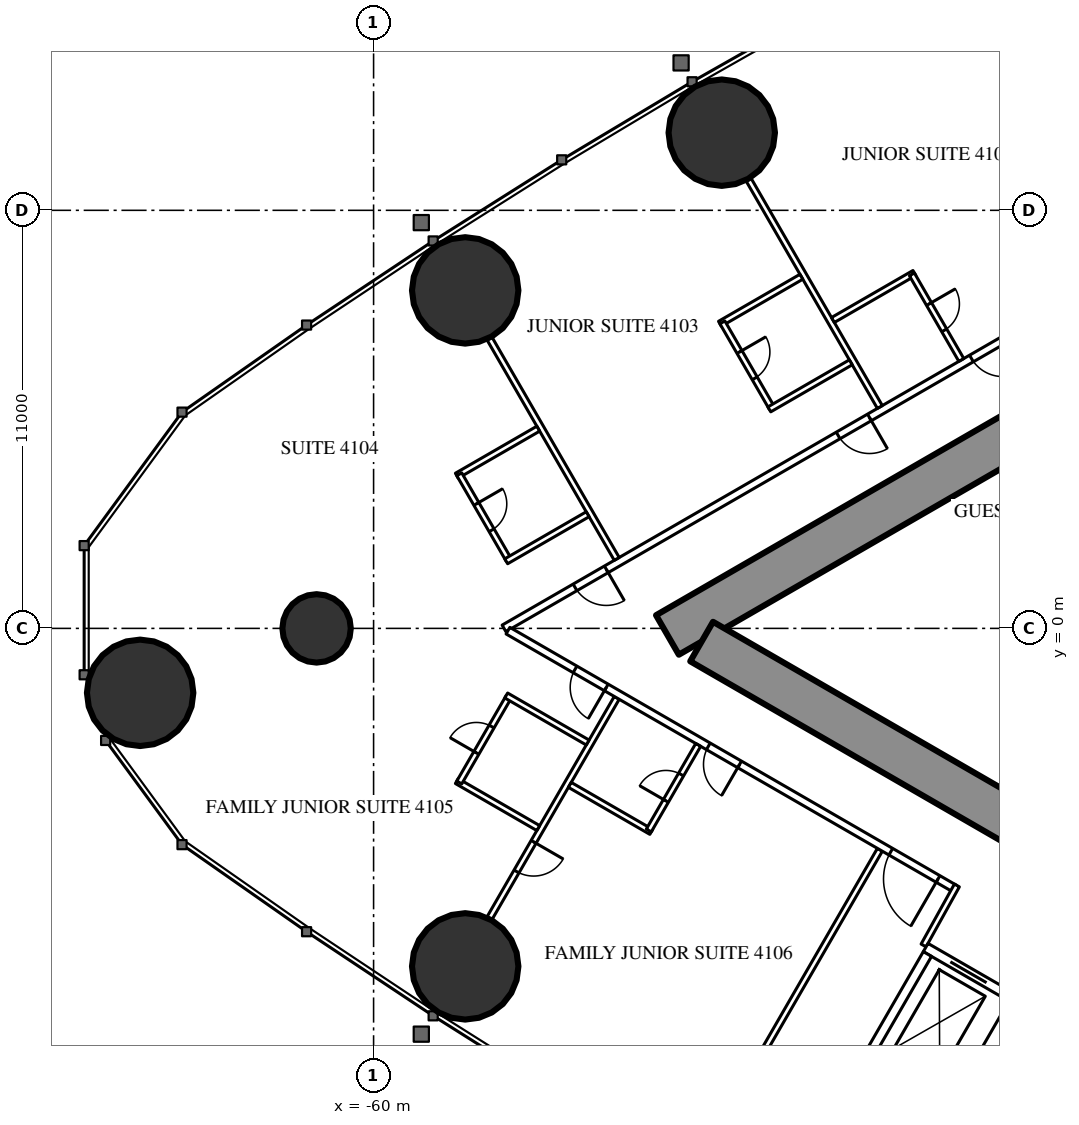
"""IFC4 building model, lengths in metres.
Left out: names, types, materials, properties, quantities, classifications, styles, units other than length and angle.
Written with IfcOpenShell. Run it as: python <this file> out.ifc"""

import sys

from ifc_helpers import new_model, si_unit, direction, frame, frame_2d, origin, origin_2d, place, context, subcontext, project, spatial, rectangle, circle, extrude, element, fill, save


model = new_model("IFC4")
c1 = context("Model", 3, precision=1e-05, world=origin(), true_north=direction((0.0, 1.0)))
c2 = subcontext(c1, "Body", "Model", "MODEL_VIEW")
j1 = project(units=[si_unit("LENGTHUNIT", "METRE"), si_unit("PLANEANGLEUNIT", "RADIAN")], contexts=[c1])
p1 = place(None, origin())
s1 = spatial("IfcSite", under=j1, at=p1, CompositionType="ELEMENT")
p2 = place(p1, origin())
s2 = spatial("IfcBuilding", under=s1, at=p2, CompositionType="ELEMENT")
p3 = place(p2, frame((0.0, 0.0, 156.3)))
s3 = spatial("IfcBuildingStorey", under=s2, at=p3, CompositionType="ELEMENT", Elevation=156.3)
for number, where, z_axis, x_axis in (
    (1, (-66.143, -1.695, 0.0), (0.0, 0.0, 1.0), (1.0, 0.0, 0.0)),
    (2, (-57.59, -8.893, 0.0), (0.0, 0.0, 1.0), (1.0, 0.0, 0.0)),
    (3, (-50.839, 13.043, 0.0), (0.0, 0.0, 1.0), (1.0, 0.0, 0.0)),
    (4, (-57.59, 8.893, 0.0), (0.0, 0.0, 1.0), (1.0, 0.0, 0.0)),
):
    element("IfcColumn", number, at=place(p3, frame(where, z_axis=z_axis, x_axis=x_axis)), inside=s3, PredefinedType="COLUMN", context=c2, shape_type="SweptSolid", body=[
        extrude(circle(Radius=1.4, at=origin_2d()), origin(), (0.0, 0.0, 1.0), 3.5),
    ])
p4 = place(p3, frame((-61.5, 0.0, 0.0), z_axis=(0.0, 0.0, 1.0), x_axis=(1.0, 0.0, 0.0)))
e5 = element("IfcColumn", 5, at=p4, inside=s3, PredefinedType="COLUMN", context=c2, shape_type="SweptSolid", body=[
    extrude(circle(Radius=0.9, at=origin_2d()), origin(), (0.0, 0.0, 1.0), 3.5),
])
p5 = place(p3, frame((-27.2, 14.3, 0.0), z_axis=(0.0, 0.0, 1.0), x_axis=(-0.866026593062, -0.499997940104, 0.0)))
e6 = element("IfcWall", 6, at=p5, inside=s3, PredefinedType="SHEAR", context=c2, shape_type="SweptSolid", body=[
    extrude(rectangle(XDim=28.946, YDim=1.2, at=frame_2d((14.473, 0.0))), origin(), (0.0, 0.0, 1.0), 3.5),
])
p6 = place(p5, frame((4.6, 0.0, 0.0)))
e7 = element("IfcOpeningElement", 7, at=p6, cuts=e6, PredefinedType="OPENING", context=c2, shape_type="SweptSolid", body=[
    extrude(rectangle(XDim=1.0, YDim=2.2, at=frame_2d((0.5, 1.1))), frame((0.0, 0.61, 0.0), z_axis=(0.0, -1.0, 0.0), x_axis=(1.0, 0.0, 0.0)), (0.0, 0.0, 1.0), 1.22),
])
p7 = place(p5, frame((13.395, 0.0, 0.0)))
e8 = element("IfcOpeningElement", 8, at=p7, cuts=e6, PredefinedType="OPENING", context=c2, shape_type="SweptSolid", body=[
    extrude(rectangle(XDim=1.8, YDim=2.2, at=frame_2d((0.9, 1.1))), frame((0.0, 0.61, 0.0), z_axis=(0.0, -1.0, 0.0), x_axis=(1.0, 0.0, 0.0)), (0.0, 0.0, 1.0), 1.22),
])
p8 = place(p3, frame((-27.2, -14.3, 0.0), z_axis=(0.0, 0.0, 1.0), x_axis=(-0.866024021859, 0.500002393557, 0.0)))
e9 = element("IfcWall", 9, at=p8, inside=s3, PredefinedType="SHEAR", context=c2, shape_type="SweptSolid", body=[
    extrude(rectangle(XDim=27.907, YDim=1.2, at=frame_2d((13.954, 0.0))), origin(), (0.0, 0.0, 1.0), 3.5),
])
p9 = place(p8, frame((4.6, 0.0, 0.0)))
e10 = element("IfcOpeningElement", 10, at=p9, cuts=e9, PredefinedType="OPENING", context=c2, shape_type="SweptSolid", body=[
    extrude(rectangle(XDim=1.0, YDim=2.2, at=frame_2d((0.5, 1.1))), frame((0.0, 0.61, 0.0), z_axis=(0.0, -1.0, 0.0), x_axis=(1.0, 0.0, 0.0)), (0.0, 0.0, 1.0), 1.22),
])
p10 = place(p8, frame((13.395, 0.0, 0.0)))
e11 = element("IfcOpeningElement", 11, at=p10, cuts=e9, PredefinedType="OPENING", context=c2, shape_type="SweptSolid", body=[
    extrude(rectangle(XDim=1.8, YDim=2.2, at=frame_2d((0.9, 1.1))), frame((0.0, 0.61, 0.0), z_axis=(0.0, -1.0, 0.0), x_axis=(1.0, 0.0, 0.0)), (0.0, 0.0, 1.0), 1.22),
])
p11 = place(p3, frame((-27.86, 16.575, 0.0), z_axis=(0.0, 0.0, 1.0), x_axis=(-0.866025533911, -0.499999774615, 0.0)))
e12 = element("IfcWall", 12, at=p11, inside=s3, PredefinedType="PARTITIONING", context=c2, shape_type="SweptSolid", body=[
    extrude(rectangle(XDim=33.149, YDim=0.2, at=frame_2d((16.575, 0.0))), origin(), (0.0, 0.0, 1.0), 3.25),
])
p12 = place(p11, frame((3.75, 0.0, 0.0)))
e13 = element("IfcOpeningElement", 13, at=p12, cuts=e12, PredefinedType="OPENING", context=c2, shape_type="SweptSolid", body=[
    extrude(rectangle(XDim=1.0, YDim=2.2, at=frame_2d((0.5, 1.1))), frame((0.0, 0.11, 0.0), z_axis=(0.0, -1.0, 0.0), x_axis=(1.0, 0.0, 0.0)), (0.0, 0.0, 1.0), 0.22),
])
p13 = place(p11, frame((17.997, 0.0, 0.0)))
e14 = element("IfcOpeningElement", 14, at=p13, cuts=e12, PredefinedType="OPENING", context=c2, shape_type="SweptSolid", body=[
    extrude(rectangle(XDim=0.95, YDim=2.2, at=frame_2d((0.475, 1.1))), frame((0.0, 0.11, 0.0), z_axis=(0.0, -1.0, 0.0), x_axis=(1.0, 0.0, 0.0)), (0.0, 0.0, 1.0), 0.22),
])
p14 = place(p11, frame((22.047, 0.0, 0.0)))
e15 = element("IfcOpeningElement", 15, at=p14, cuts=e12, PredefinedType="OPENING", context=c2, shape_type="SweptSolid", body=[
    extrude(rectangle(XDim=0.95, YDim=2.2, at=frame_2d((0.475, 1.1))), frame((0.0, 0.11, 0.0), z_axis=(0.0, -1.0, 0.0), x_axis=(1.0, 0.0, 0.0)), (0.0, 0.0, 1.0), 0.22),
])
p15 = place(p11, frame((30.042, 0.0, 0.0)))
e16 = element("IfcOpeningElement", 16, at=p15, cuts=e12, PredefinedType="OPENING", context=c2, shape_type="SweptSolid", body=[
    extrude(rectangle(XDim=0.95, YDim=2.2, at=frame_2d((0.475, 1.1))), frame((0.0, 0.11, 0.0), z_axis=(0.0, -1.0, 0.0), x_axis=(1.0, 0.0, 0.0)), (0.0, 0.0, 1.0), 0.22),
])
p16 = place(p3, frame((-46.679, 5.825, 0.0), z_axis=(0.0, 0.0, 1.0), x_axis=(-0.500006839597, 0.866021454905, 0.0)))
e17 = element("IfcWall", 17, at=p16, inside=s3, PredefinedType="PARTITIONING", context=c2, shape_type="SweptSolid", body=[
    extrude(rectangle(XDim=6.911, YDim=0.15, at=frame_2d((3.456, 0.0))), origin(), (0.0, 0.0, 1.0), 2.3),
])
p17 = place(p3, frame((-53.602, 1.828, 0.0), z_axis=(0.0, 0.0, 1.0), x_axis=(-0.49999191814, 0.866030069798, 0.0)))
e18 = element("IfcWall", 18, at=p17, inside=s3, PredefinedType="PARTITIONING", context=c2, shape_type="SweptSolid", body=[
    extrude(rectangle(XDim=6.692, YDim=0.15, at=frame_2d((3.346, 0.0))), origin(), (0.0, 0.0, 1.0), 2.3),
])
p18 = place(p3, frame((-46.679, -5.825, 0.0), z_axis=(0.0, 0.0, 1.0), x_axis=(-0.500006839597, -0.866021454905, 0.0)))
e19 = element("IfcWall", 19, at=p18, inside=s3, PredefinedType="PARTITIONING", context=c2, shape_type="SweptSolid", body=[
    extrude(rectangle(XDim=6.911, YDim=0.15, at=frame_2d((3.456, 0.0))), origin(), (0.0, 0.0, 1.0), 2.3),
])
p19 = place(p3, frame((-53.602, -1.828, 0.0), z_axis=(0.0, 0.0, 1.0), x_axis=(-0.49999191814, -0.866030069798, 0.0)))
e20 = element("IfcWall", 20, at=p19, inside=s3, PredefinedType="PARTITIONING", context=c2, shape_type="SweptSolid", body=[
    extrude(rectangle(XDim=6.692, YDim=0.15, at=frame_2d((3.346, 0.0))), origin(), (0.0, 0.0, 1.0), 2.3),
])
p20 = place(p19, frame((4.375, 0.0, 0.0)))
e21 = element("IfcOpeningElement", 21, at=p20, cuts=e20, PredefinedType="OPENING", context=c2, shape_type="SweptSolid", body=[
    extrude(rectangle(XDim=0.9, YDim=2.2, at=frame_2d((0.45, 1.1))), frame((0.0, 0.085, 0.0), z_axis=(0.0, -1.0, 0.0), x_axis=(1.0, 0.0, 0.0)), (0.0, 0.0, 1.0), 0.17),
])
p21 = place(p3, frame((-44.715, -6.844, 0.0), z_axis=(0.0, 0.0, 1.0), x_axis=(-0.866025261224, 0.500000246922, 0.0)))
e22 = element("IfcWall", 22, at=p21, inside=s3, PredefinedType="PARTITIONING", context=c2, shape_type="SweptSolid", body=[
    extrude(rectangle(XDim=13.567, YDim=0.2, at=frame_2d((6.783, 0.0))), origin(), (0.0, 0.0, 1.0), 3.25),
])
p22 = place(p21, frame((10.579, 0.0, 0.0)))
e23 = element("IfcOpeningElement", 23, at=p22, cuts=e22, PredefinedType="OPENING", context=c2, shape_type="SweptSolid", body=[
    extrude(rectangle(XDim=0.95, YDim=2.2, at=frame_2d((0.475, 1.1))), frame((0.0, 0.11, 0.0), z_axis=(0.0, -1.0, 0.0), x_axis=(1.0, 0.0, 0.0)), (0.0, 0.0, 1.0), 0.22),
])
p23 = place(p21, frame((6.529, 0.0, 0.0)))
e24 = element("IfcOpeningElement", 24, at=p23, cuts=e22, PredefinedType="OPENING", context=c2, shape_type="SweptSolid", body=[
    extrude(rectangle(XDim=0.95, YDim=2.2, at=frame_2d((0.475, 1.1))), frame((0.0, 0.11, 0.0), z_axis=(0.0, -1.0, 0.0), x_axis=(1.0, 0.0, 0.0)), (0.0, 0.0, 1.0), 0.22),
])
p24 = place(p21, frame((0.5, 0.0, 0.0)))
e25 = element("IfcOpeningElement", 25, at=p24, cuts=e22, PredefinedType="OPENING", context=c2, shape_type="SweptSolid", body=[
    extrude(rectangle(XDim=1.435, YDim=2.2, at=frame_2d((0.718, 1.1))), frame((0.0, 0.11, 0.0), z_axis=(0.0, -1.0, 0.0), x_axis=(1.0, 0.0, 0.0)), (0.0, 0.0, 1.0), 0.22),
])
p25 = place(p3, frame((-44.652, -6.764, 0.0), z_axis=(0.0, 0.0, 1.0), x_axis=(-0.485424724123, -0.874278466629, 0.0)))
e26 = element("IfcWall", 26, at=p25, inside=s3, PredefinedType="PARTITIONING", context=c2, shape_type="SweptSolid", body=[
    extrude(rectangle(XDim=1.805, YDim=0.15, at=frame_2d((0.903, 0.0))), origin(), (0.0, 0.0, 1.0), 3.25),
])
p26 = place(p3, frame((-45.771, 9.352, 0.0), z_axis=(0.0, 0.0, 1.0), x_axis=(-0.866006523861, -0.500032699561, 0.0)))
e27 = element("IfcWall", 27, at=p26, inside=s3, PredefinedType="PARTITIONING", context=c2, shape_type="SweptSolid", body=[
    extrude(rectangle(XDim=2.475, YDim=0.15, at=frame_2d((1.237, 0.0))), origin(), (0.0, 0.0, 1.0), 3.25),
])
p27 = place(p3, frame((-44.535, 7.063, 0.0), z_axis=(0.0, 0.0, 1.0), x_axis=(-0.500047596559, 0.865997922154, 0.0)))
e28 = element("IfcWall", 28, at=p27, inside=s3, PredefinedType="PARTITIONING", context=c2, shape_type="SweptSolid", body=[
    extrude(rectangle(XDim=2.6, YDim=0.15, at=frame_2d((1.3, 0.0))), origin(), (0.0, 0.0, 1.0), 3.25),
])
p28 = place(p27, frame((0.9, 0.0, 0.0)))
e29 = element("IfcOpeningElement", 29, at=p28, cuts=e28, PredefinedType="OPENING", context=c2, shape_type="SweptSolid", body=[
    extrude(rectangle(XDim=0.8, YDim=2.2, at=frame_2d((0.4, 1.1))), frame((0.0, 0.085, 0.0), z_axis=(0.0, -1.0, 0.0), x_axis=(1.0, 0.0, 0.0)), (0.0, 0.0, 1.0), 0.17),
])
p29 = place(p3, frame((-48.744, 9.252, 0.0), z_axis=(0.0, 0.0, 1.0), x_axis=(-0.866006523861, -0.500032699561, 0.0)))
e30 = element("IfcWall", 30, at=p29, inside=s3, PredefinedType="PARTITIONING", context=c2, shape_type="SweptSolid", body=[
    extrude(rectangle(XDim=2.475, YDim=0.15, at=frame_2d((1.237, 0.0))), origin(), (0.0, 0.0, 1.0), 3.25),
])
p30 = place(p3, frame((-49.522, 5.8, 0.0), z_axis=(0.0, 0.0, 1.0), x_axis=(-0.500006934395, 0.866021400173, 0.0)))
e31 = element("IfcWall", 31, at=p30, inside=s3, PredefinedType="PARTITIONING", context=c2, shape_type="SweptSolid", body=[
    extrude(rectangle(XDim=2.6, YDim=0.15, at=frame_2d((1.3, 0.0))), origin(), (0.0, 0.0, 1.0), 3.25),
])
p31 = place(p30, frame((0.9, 0.0, 0.0)))
e32 = element("IfcOpeningElement", 32, at=p31, cuts=e31, PredefinedType="OPENING", context=c2, shape_type="SweptSolid", body=[
    extrude(rectangle(XDim=0.8, YDim=2.2, at=frame_2d((0.4, 1.1))), frame((0.0, 0.085, 0.0), z_axis=(0.0, -1.0, 0.0), x_axis=(1.0, 0.0, 0.0)), (0.0, 0.0, 1.0), 0.17),
])
for number, where, z_axis, x_axis in (
    (33, (-47.444, 7.0, 0.0), (0.0, 0.0, 1.0), (-0.866, -0.5, 0.0)),
    (34, (-55.667, 5.255, 0.0), (0.0, 0.0, 1.0), (-0.866, -0.5, 0.0)),
):
    element("IfcWall", number, at=place(p3, frame(where, z_axis=z_axis, x_axis=x_axis)), inside=s3, PredefinedType="PARTITIONING", context=c2, shape_type="SweptSolid", body=[
        extrude(rectangle(XDim=2.475, YDim=0.15, at=frame_2d((1.237, 0.0))), origin(), (0.0, 0.0, 1.0), 3.25),
    ])
p32 = place(p3, frame((-56.446, 1.803, 0.0), z_axis=(0.0, 0.0, 1.0), x_axis=(-0.499936506574, 0.866062058628, 0.0)))
e35 = element("IfcWall", 35, at=p32, inside=s3, PredefinedType="PARTITIONING", context=c2, shape_type="SweptSolid", body=[
    extrude(rectangle(XDim=2.6, YDim=0.15, at=frame_2d((1.3, 0.0))), origin(), (0.0, 0.0, 1.0), 3.25),
])
p33 = place(p32, frame((0.9, 0.0, 0.0)))
e36 = element("IfcOpeningElement", 36, at=p33, cuts=e35, PredefinedType="OPENING", context=c2, shape_type="SweptSolid", body=[
    extrude(rectangle(XDim=0.8, YDim=2.2, at=frame_2d((0.4, 1.1))), frame((0.0, 0.085, 0.0), z_axis=(0.0, -1.0, 0.0), x_axis=(1.0, 0.0, 0.0)), (0.0, 0.0, 1.0), 0.17),
])
p34 = place(p3, frame((-54.367, 3.003, 0.0), z_axis=(0.0, 0.0, 1.0), x_axis=(-0.866031185235, -0.4999899861, 0.0)))
e37 = element("IfcWall", 37, at=p34, inside=s3, PredefinedType="PARTITIONING", context=c2, shape_type="SweptSolid", body=[
    extrude(rectangle(XDim=2.475, YDim=0.15, at=frame_2d((1.238, 0.0))), origin(), (0.0, 0.0, 1.0), 3.25),
])
p35 = place(p3, frame((-55.667, -5.255, 0.0), z_axis=(0.0, 0.0, 1.0), x_axis=(-0.866006523861, 0.500032699561, 0.0)))
e38 = element("IfcWall", 38, at=p35, inside=s3, PredefinedType="PARTITIONING", context=c2, shape_type="SweptSolid", body=[
    extrude(rectangle(XDim=2.475, YDim=0.15, at=frame_2d((1.237, 0.0))), origin(), (0.0, 0.0, 1.0), 3.25),
])
p36 = place(p3, frame((-56.446, -1.803, 0.0), z_axis=(0.0, 0.0, 1.0), x_axis=(-0.499936506574, -0.866062058628, 0.0)))
e39 = element("IfcWall", 39, at=p36, inside=s3, PredefinedType="PARTITIONING", context=c2, shape_type="SweptSolid", body=[
    extrude(rectangle(XDim=2.6, YDim=0.15, at=frame_2d((1.3, 0.0))), origin(), (0.0, 0.0, 1.0), 3.25),
])
p37 = place(p36, frame((0.9, 0.0, 0.0)))
e40 = element("IfcOpeningElement", 40, at=p37, cuts=e39, PredefinedType="OPENING", context=c2, shape_type="SweptSolid", body=[
    extrude(rectangle(XDim=0.8, YDim=2.2, at=frame_2d((0.4, 1.1))), frame((0.0, 0.085, 0.0), z_axis=(0.0, -1.0, 0.0), x_axis=(1.0, 0.0, 0.0)), (0.0, 0.0, 1.0), 0.17),
])
for number, where, z_axis, x_axis in (
    (41, (-54.367, -3.003, 0.0), (0.0, 0.0, 1.0), (-0.866, 0.5, 0.0)),
    (42, (-52.694, -5.355, 0.0), (0.0, 0.0, 1.0), (-0.866, 0.5, 0.0)),
):
    element("IfcWall", number, at=place(p3, frame(where, z_axis=z_axis, x_axis=x_axis)), inside=s3, PredefinedType="PARTITIONING", context=c2, shape_type="SweptSolid", body=[
        extrude(rectangle(XDim=2.475, YDim=0.15, at=frame_2d((1.238, 0.0))), origin(), (0.0, 0.0, 1.0), 3.25),
    ])
p38 = place(p3, frame((-51.459, -3.065, 0.0), z_axis=(0.0, 0.0, 1.0), x_axis=(-0.499936506574, -0.866062058628, 0.0)))
e43 = element("IfcWall", 43, at=p38, inside=s3, PredefinedType="PARTITIONING", context=c2, shape_type="SweptSolid", body=[
    extrude(rectangle(XDim=2.6, YDim=0.15, at=frame_2d((1.3, 0.0))), origin(), (0.0, 0.0, 1.0), 3.25),
])
p39 = place(p38, frame((0.9, 0.0, 0.0)))
e44 = element("IfcOpeningElement", 44, at=p39, cuts=e43, PredefinedType="OPENING", context=c2, shape_type="SweptSolid", body=[
    extrude(rectangle(XDim=0.8, YDim=2.2, at=frame_2d((0.4, 1.1))), frame((0.0, 0.085, 0.0), z_axis=(0.0, -1.0, 0.0), x_axis=(1.0, 0.0, 0.0)), (0.0, 0.0, 1.0), 0.17),
])
p40 = place(p3, frame((-39.758, -11.697, 0.0), z_axis=(0.0, 0.0, 1.0), x_axis=(-0.866024194504, 0.500002094529, 0.0)))
e45 = element("IfcWall", 45, at=p40, inside=s3, PredefinedType="PARTITIONING", context=c2, shape_type="SweptSolid", body=[
    extrude(rectangle(XDim=6.6, YDim=0.25, at=frame_2d((3.3, 0.0))), origin(), (0.0, 0.0, 1.0), 3.25),
])
p41 = place(p40, frame((0.75, 0.0, 0.0)))
e46 = element("IfcOpeningElement", 46, at=p41, cuts=e45, PredefinedType="OPENING", context=c2, shape_type="SweptSolid", body=[
    extrude(rectangle(XDim=1.1, YDim=2.2, at=frame_2d((0.55, 1.1))), frame((0.0, 0.135, 0.0), z_axis=(0.0, -1.0, 0.0), x_axis=(1.0, 0.0, 0.0)), (0.0, 0.0, 1.0), 0.27),
])
p42 = place(p40, frame((2.75, 0.0, 0.0)))
e47 = element("IfcOpeningElement", 47, at=p42, cuts=e45, PredefinedType="OPENING", context=c2, shape_type="SweptSolid", body=[
    extrude(rectangle(XDim=1.1, YDim=2.2, at=frame_2d((0.55, 1.1))), frame((0.0, 0.135, 0.0), z_axis=(0.0, -1.0, 0.0), x_axis=(1.0, 0.0, 0.0)), (0.0, 0.0, 1.0), 0.27),
])
p43 = place(p40, frame((4.75, 0.0, 0.0)))
e48 = element("IfcOpeningElement", 48, at=p43, cuts=e45, PredefinedType="OPENING", context=c2, shape_type="SweptSolid", body=[
    extrude(rectangle(XDim=1.1, YDim=2.2, at=frame_2d((0.55, 1.1))), frame((0.0, 0.135, 0.0), z_axis=(0.0, -1.0, 0.0), x_axis=(1.0, 0.0, 0.0)), (0.0, 0.0, 1.0), 0.27),
])
p44 = place(p3, frame((-45.428, -8.568, 0.0), z_axis=(0.0, 0.0, 1.0), x_axis=(-0.499929347863, -0.866066190972, 0.0)))
e49 = element("IfcWall", 49, at=p44, inside=s3, PredefinedType="PARTITIONING", context=c2, shape_type="SweptSolid", body=[
    extrude(rectangle(XDim=3.201, YDim=0.25, at=frame_2d((1.6, 0.0))), origin(), (0.0, 0.0, 1.0), 3.25),
])
p45 = place(p28, origin())
e50 = element("IfcDoor", 50, at=p45, inside=s3, OperationType="SINGLE_SWING_RIGHT", PredefinedType="DOOR", context=c2, shape_type="SweptSolid", body=[
    extrude(rectangle(XDim=0.8, YDim=2.2, at=frame_2d((0.4, 1.1))), frame((0.0, 0.025, 0.0), z_axis=(0.0, -1.0, 0.0), x_axis=(1.0, 0.0, 0.0)), (0.0, 0.0, 1.0), 0.05),
])
fill(e29, e50)
p46 = place(p13, origin())
e51 = element("IfcDoor", 51, at=p46, inside=s3, OperationType="SINGLE_SWING_LEFT", PredefinedType="DOOR", context=c2, shape_type="SweptSolid", body=[
    extrude(rectangle(XDim=0.95, YDim=2.2, at=frame_2d((0.475, 1.1))), frame((0.0, 0.025, 0.0), z_axis=(0.0, -1.0, 0.0), x_axis=(1.0, 0.0, 0.0)), (0.0, 0.0, 1.0), 0.05),
])
fill(e14, e51)
p47 = place(p31, origin())
e52 = element("IfcDoor", 52, at=p47, inside=s3, OperationType="SINGLE_SWING_RIGHT", PredefinedType="DOOR", context=c2, shape_type="SweptSolid", body=[
    extrude(rectangle(XDim=0.8, YDim=2.2, at=frame_2d((0.4, 1.1))), frame((0.0, 0.025, 0.0), z_axis=(0.0, -1.0, 0.0), x_axis=(1.0, 0.0, 0.0)), (0.0, 0.0, 1.0), 0.05),
])
fill(e32, e52)
p48 = place(p14, origin())
e53 = element("IfcDoor", 53, at=p48, inside=s3, OperationType="SINGLE_SWING_LEFT", PredefinedType="DOOR", context=c2, shape_type="SweptSolid", body=[
    extrude(rectangle(XDim=0.95, YDim=2.2, at=frame_2d((0.475, 1.1))), frame((0.0, 0.025, 0.0), z_axis=(0.0, -1.0, 0.0), x_axis=(1.0, 0.0, 0.0)), (0.0, 0.0, 1.0), 0.05),
])
fill(e15, e53)
p49 = place(p33, origin())
e54 = element("IfcDoor", 54, at=p49, inside=s3, OperationType="SINGLE_SWING_RIGHT", PredefinedType="DOOR", context=c2, shape_type="SweptSolid", body=[
    extrude(rectangle(XDim=0.8, YDim=2.2, at=frame_2d((0.4, 1.1))), frame((0.0, 0.025, 0.0), z_axis=(0.0, -1.0, 0.0), x_axis=(1.0, 0.0, 0.0)), (0.0, 0.0, 1.0), 0.05),
])
fill(e36, e54)
p50 = place(p15, origin())
e55 = element("IfcDoor", 55, at=p50, inside=s3, OperationType="SINGLE_SWING_LEFT", PredefinedType="DOOR", context=c2, shape_type="SweptSolid", body=[
    extrude(rectangle(XDim=0.95, YDim=2.2, at=frame_2d((0.475, 1.1))), frame((0.0, 0.025, 0.0), z_axis=(0.0, -1.0, 0.0), x_axis=(1.0, 0.0, 0.0)), (0.0, 0.0, 1.0), 0.05),
])
fill(e16, e55)
p51 = place(p37, origin())
e56 = element("IfcDoor", 56, at=p51, inside=s3, OperationType="SINGLE_SWING_RIGHT", PredefinedType="DOOR", context=c2, shape_type="SweptSolid", body=[
    extrude(rectangle(XDim=0.8, YDim=2.2, at=frame_2d((0.4, 1.1))), frame((0.0, 0.025, 0.0), z_axis=(0.0, -1.0, 0.0), x_axis=(1.0, 0.0, 0.0)), (0.0, 0.0, 1.0), 0.05),
])
fill(e40, e56)
p52 = place(p22, origin())
e57 = element("IfcDoor", 57, at=p52, inside=s3, OperationType="SINGLE_SWING_LEFT", PredefinedType="DOOR", context=c2, shape_type="SweptSolid", body=[
    extrude(rectangle(XDim=0.95, YDim=2.2, at=frame_2d((0.475, 1.1))), frame((0.0, 0.025, 0.0), z_axis=(0.0, -1.0, 0.0), x_axis=(1.0, 0.0, 0.0)), (0.0, 0.0, 1.0), 0.05),
])
fill(e23, e57)
p53 = place(p39, origin())
e58 = element("IfcDoor", 58, at=p53, inside=s3, OperationType="SINGLE_SWING_RIGHT", PredefinedType="DOOR", context=c2, shape_type="SweptSolid", body=[
    extrude(rectangle(XDim=0.8, YDim=2.2, at=frame_2d((0.4, 1.1))), frame((0.0, 0.025, 0.0), z_axis=(0.0, -1.0, 0.0), x_axis=(1.0, 0.0, 0.0)), (0.0, 0.0, 1.0), 0.05),
])
fill(e44, e58)
p54 = place(p23, origin())
e59 = element("IfcDoor", 59, at=p54, inside=s3, OperationType="SINGLE_SWING_LEFT", PredefinedType="DOOR", context=c2, shape_type="SweptSolid", body=[
    extrude(rectangle(XDim=0.95, YDim=2.2, at=frame_2d((0.475, 1.1))), frame((0.0, 0.025, 0.0), z_axis=(0.0, -1.0, 0.0), x_axis=(1.0, 0.0, 0.0)), (0.0, 0.0, 1.0), 0.05),
])
fill(e24, e59)
p55 = place(p24, origin())
e60 = element("IfcDoor", 60, at=p55, inside=s3, OperationType="SINGLE_SWING_LEFT", PredefinedType="DOOR", context=c2, shape_type="SweptSolid", body=[
    extrude(rectangle(XDim=1.435, YDim=2.2, at=frame_2d((0.718, 1.1))), frame((0.0, 0.025, 0.0), z_axis=(0.0, -1.0, 0.0), x_axis=(1.0, 0.0, 0.0)), (0.0, 0.0, 1.0), 0.05),
])
fill(e25, e60)
p56 = place(p20, origin())
e61 = element("IfcDoor", 61, at=p56, inside=s3, OperationType="SINGLE_SWING_LEFT", PredefinedType="DOOR", context=c2, shape_type="SweptSolid", body=[
    extrude(rectangle(XDim=0.9, YDim=2.2, at=frame_2d((0.45, 1.1))), frame((0.0, 0.025, 0.0), z_axis=(0.0, -1.0, 0.0), x_axis=(1.0, 0.0, 0.0)), (0.0, 0.0, 1.0), 0.05),
])
fill(e21, e61)
p57 = place(p43, origin())
e62 = element("IfcDoor", 62, at=p57, inside=s3, OperationType="DOUBLE_DOOR_SLIDING", PredefinedType="USERDEFINED", context=c2, shape_type="SweptSolid", body=[
    extrude(rectangle(XDim=1.1, YDim=2.2, at=frame_2d((0.55, 1.1))), frame((0.0, 0.025, 0.0), z_axis=(0.0, -1.0, 0.0), x_axis=(1.0, 0.0, 0.0)), (0.0, 0.0, 1.0), 0.05),
])
fill(e48, e62)
save(model, sys.argv[1])
